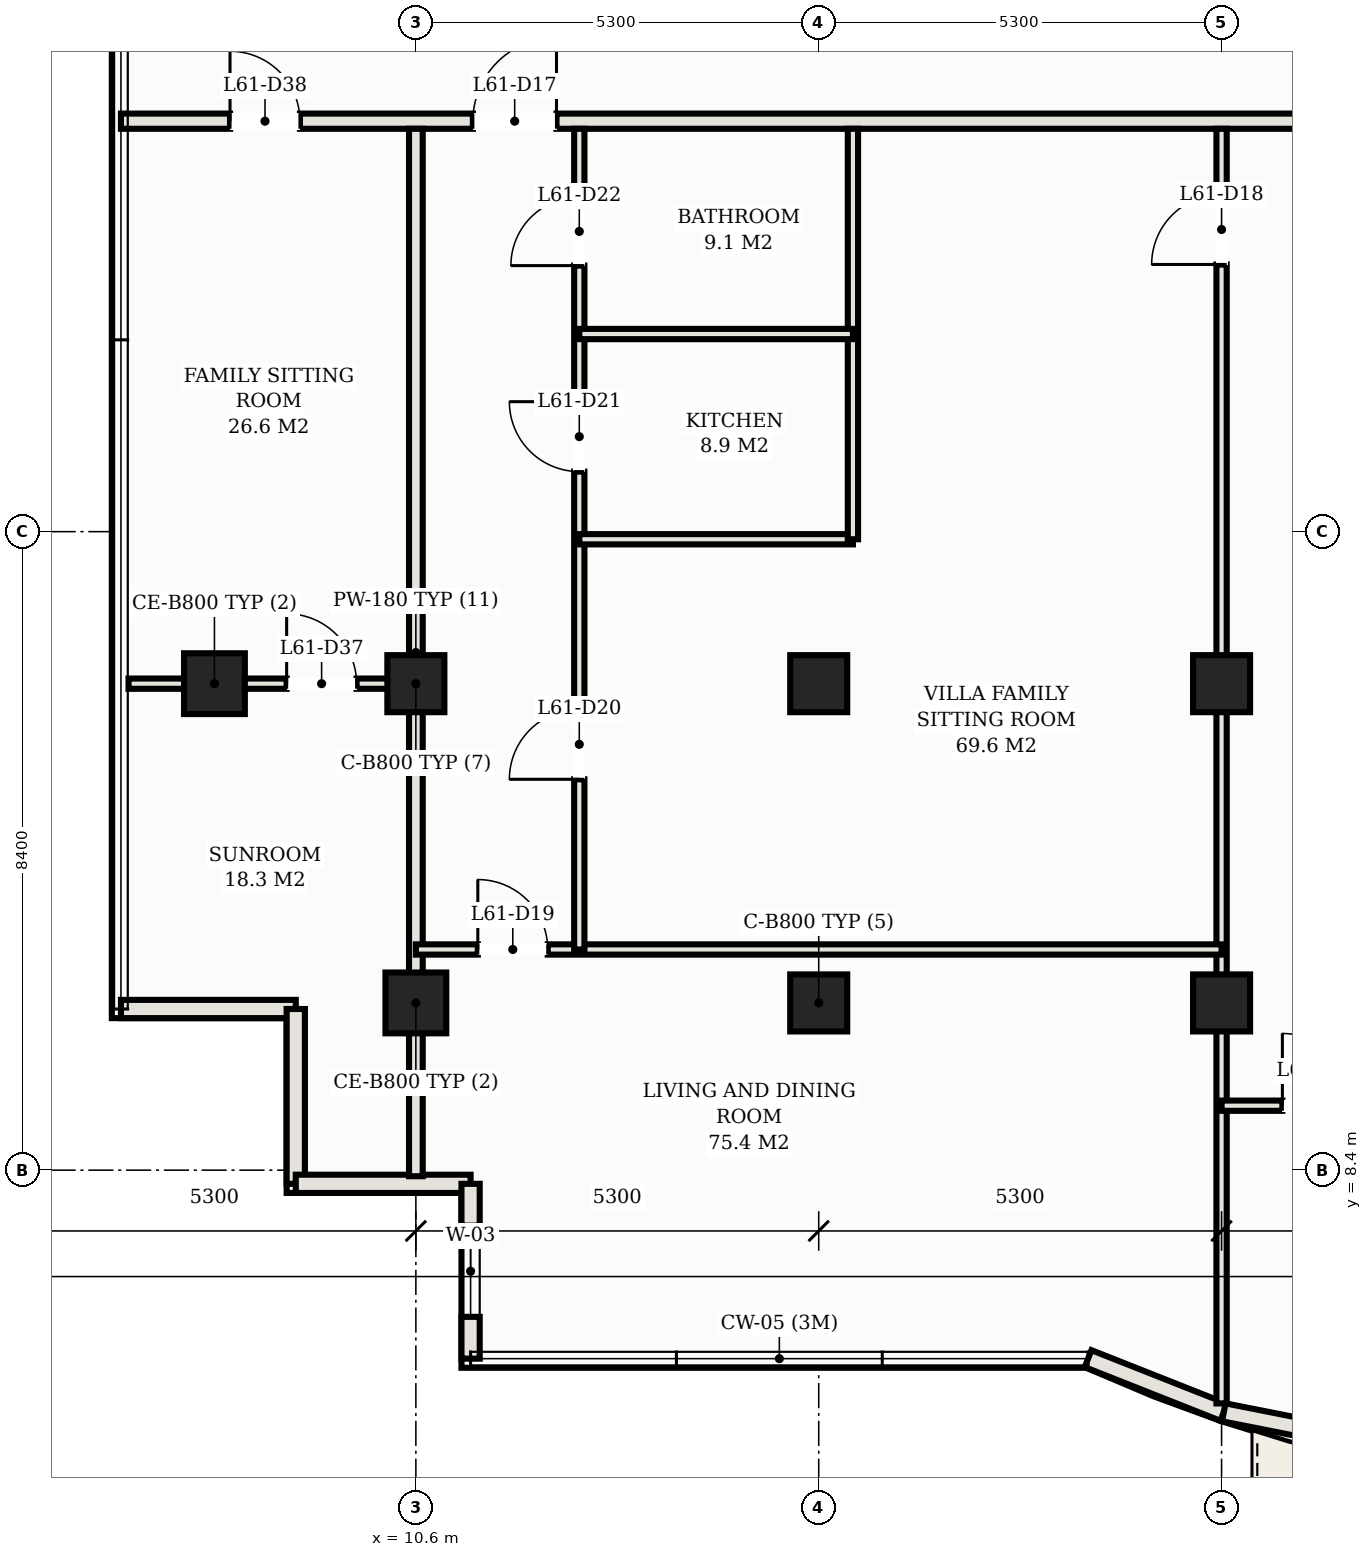
"""IFC4 building model, lengths in metres.
Left out: names, types, materials, properties, quantities, classifications, styles, units other than length and angle.
Written with IfcOpenShell. Run it as: python <this file> out.ifc"""

import sys

from ifc_helpers import new_model, si_unit, direction, frame, frame_2d, origin, origin_2d, place, context, subcontext, project, spatial, rectangle, hollow_rectangle, extrude, element, fill, save


model = new_model("IFC4")
c1 = context("Model", 3, precision=1e-05, world=origin(), true_north=direction((0.0, 1.0)))
c2 = subcontext(c1, "Body", "Model", "MODEL_VIEW")
j1 = project(units=[si_unit("LENGTHUNIT", "METRE"), si_unit("PLANEANGLEUNIT", "RADIAN")], contexts=[c1])
p1 = place(None, origin())
s1 = spatial("IfcSite", under=j1, at=p1, CompositionType="ELEMENT")
p2 = place(p1, origin())
s2 = spatial("IfcBuilding", under=s1, at=p2, CompositionType="ELEMENT")
p3 = place(p2, frame((0.0, 0.0, 223.1)))
s3 = spatial("IfcBuildingStorey", under=s2, at=p3, CompositionType="ELEMENT", Elevation=223.1)
p4 = place(p3, frame((10.6, 14.8, 0.0), z_axis=(0.0, 0.0, 1.0), x_axis=(1.0, 0.0, 0.0)))
e1 = element("IfcColumn", 1, at=p4, inside=s3, PredefinedType="COLUMN", context=c2, shape_type="SweptSolid", body=[
    extrude(hollow_rectangle(XDim=0.75, YDim=0.75, WallThickness=0.025, at=origin_2d()), origin(), (0.0, 0.0, 1.0), 3.3),
])
p5 = place(p3, frame((10.6, 10.6, 0.0), z_axis=(0.0, 0.0, 1.0), x_axis=(1.0, 0.0, 0.0)))
e2 = element("IfcColumn", 2, at=p5, inside=s3, PredefinedType="COLUMN", context=c2, shape_type="SweptSolid", body=[
    extrude(hollow_rectangle(XDim=0.8, YDim=0.8, WallThickness=0.028, at=origin_2d()), origin(), (0.0, 0.0, 1.0), 3.3),
])
for number, where, z_axis, x_axis in (
    (3, (15.9, 14.8, 0.0), (0.0, 0.0, 1.0), (1.0, 0.0, 0.0)),
    (4, (15.9, 10.6, 0.0), (0.0, 0.0, 1.0), (1.0, 0.0, 0.0)),
    (5, (21.2, 14.8, 0.0), (0.0, 0.0, 1.0), (1.0, 0.0, 0.0)),
    (6, (21.2, 10.6, 0.0), (0.0, 0.0, 1.0), (1.0, 0.0, 0.0)),
):
    element("IfcColumn", number, at=place(p3, frame(where, z_axis=z_axis, x_axis=x_axis)), inside=s3, PredefinedType="COLUMN", context=c2, shape_type="SweptSolid", body=[
        extrude(hollow_rectangle(XDim=0.75, YDim=0.75, WallThickness=0.025, at=origin_2d()), origin(), (0.0, 0.0, 1.0), 3.3),
    ])
p6 = place(p3, frame((7.95, 14.8, 0.0), z_axis=(0.0, 0.0, 1.0), x_axis=(1.0, 0.0, 0.0)))
e7 = element("IfcColumn", 7, at=p6, inside=s3, PredefinedType="COLUMN", context=c2, shape_type="SweptSolid", body=[
    extrude(hollow_rectangle(XDim=0.8, YDim=0.8, WallThickness=0.028, at=origin_2d()), origin(), (0.0, 0.0, 1.0), 3.3),
])
for number, where, z_axis, x_axis in (
    (8, (6.72, 10.52, 0.0), (0.0, 0.0, 1.0), (1.0, 0.0, 0.0)),
    (9, (9.02, 10.52, 0.0), (0.0, 0.0, 1.0), (0.0, -1.0, 0.0)),
    (10, (9.02, 8.22, 0.0), (0.0, 0.0, 1.0), (1.0, 0.0, 0.0)),
):
    element("IfcWall", number, at=place(p3, frame(where, z_axis=z_axis, x_axis=x_axis)), inside=s3, PredefinedType="SOLIDWALL", context=c2, shape_type="SweptSolid", body=[
        extrude(rectangle(XDim=2.3, YDim=0.24, at=frame_2d((1.15, 0.0))), origin(), (0.0, 0.0, 1.0), 3.11),
    ])
p7 = place(p3, frame((11.32, 8.22, 0.0), z_axis=(0.0, 0.0, 1.0), x_axis=(0.0, -1.0, 0.0)))
e11 = element("IfcWall", 11, at=p7, inside=s3, PredefinedType="SOLIDWALL", context=c2, shape_type="SweptSolid", body=[
    extrude(rectangle(XDim=2.3, YDim=0.24, at=frame_2d((1.15, 0.0))), origin(), (0.0, 0.0, 1.0), 3.11),
])
p8 = place(p7, frame((0.55, 0.0, 0.75)))
e12 = element("IfcOpeningElement", 12, at=p8, cuts=e11, PredefinedType="OPENING", context=c2, shape_type="SweptSolid", body=[
    extrude(rectangle(XDim=1.2, YDim=1.5, at=frame_2d((0.6, 0.75))), frame((0.0, 0.13, 0.0), z_axis=(0.0, -1.0, 0.0), x_axis=(1.0, 0.0, 0.0)), (0.0, 0.0, 1.0), 0.26),
])
p9 = place(p3, frame((19.444, 5.92, 0.0), z_axis=(0.0, 0.0, 1.0), x_axis=(0.92993442177, -0.367725401906, 0.0)))
e13 = element("IfcWall", 13, at=p9, inside=s3, PredefinedType="SOLIDWALL", context=c2, shape_type="SweptSolid", body=[
    extrude(rectangle(XDim=1.919, YDim=0.24, at=frame_2d((0.96, 0.0))), origin(), (0.0, 0.0, 1.0), 3.11),
])
p10 = place(p3, frame((21.229, 5.214, 0.0), z_axis=(0.0, 0.0, 1.0), x_axis=(0.980985349685, -0.194081796425, 0.0)))
e14 = element("IfcWall", 14, at=p10, inside=s3, PredefinedType="SOLIDWALL", context=c2, shape_type="SweptSolid", body=[
    extrude(rectangle(XDim=4.478, YDim=0.24, at=frame_2d((2.239, 0.0))), origin(), (0.0, 0.0, 1.0), 3.11),
])
p11 = place(p10, frame((1.473, 0.0, 0.0)))
e15 = element("IfcOpeningElement", 15, at=p11, cuts=e14, PredefinedType="OPENING", context=c2, shape_type="SweptSolid", body=[
    extrude(rectangle(XDim=1.8, YDim=2.2, at=frame_2d((0.9, 1.1))), frame((0.0, 0.13, 0.0), z_axis=(0.0, -1.0, 0.0), x_axis=(1.0, 0.0, 0.0)), (0.0, 0.0, 1.0), 0.26),
])
p12 = place(p3, frame((6.72, 22.2, 0.0), z_axis=(0.0, 0.0, 1.0), x_axis=(1.0, 0.0, 0.0)))
e16 = element("IfcWall", 16, at=p12, inside=s3, PredefinedType="PARTITIONING", context=c2, shape_type="SweptSolid", body=[
    extrude(rectangle(XDim=39.56, YDim=0.2, at=frame_2d((19.78, 0.0))), origin(), (0.0, 0.0, 1.0), 2.43),
])
p13 = place(p12, frame((4.63, 0.0, 0.0)))
e17 = element("IfcOpeningElement", 17, at=p13, cuts=e16, PredefinedType="OPENING", context=c2, shape_type="SweptSolid", body=[
    extrude(rectangle(XDim=1.1, YDim=2.25, at=frame_2d((0.55, 1.125))), frame((0.0, 0.11, 0.0), z_axis=(0.0, -1.0, 0.0), x_axis=(1.0, 0.0, 0.0)), (0.0, 0.0, 1.0), 0.22),
])
p14 = place(p12, frame((20.53, 0.0, 0.0)))
e18 = element("IfcOpeningElement", 18, at=p14, cuts=e16, PredefinedType="OPENING", context=c2, shape_type="SweptSolid", body=[
    extrude(rectangle(XDim=1.1, YDim=2.25, at=frame_2d((0.55, 1.125))), frame((0.0, 0.11, 0.0), z_axis=(0.0, -1.0, 0.0), x_axis=(1.0, 0.0, 0.0)), (0.0, 0.0, 1.0), 0.22),
])
p15 = place(p12, frame((1.435, 0.0, 0.0)))
e19 = element("IfcOpeningElement", 19, at=p15, cuts=e16, PredefinedType="OPENING", context=c2, shape_type="SweptSolid", body=[
    extrude(rectangle(XDim=0.92, YDim=2.15, at=frame_2d((0.46, 1.075))), frame((0.0, 0.11, 0.0), z_axis=(0.0, -1.0, 0.0), x_axis=(1.0, 0.0, 0.0)), (0.0, 0.0, 1.0), 0.22),
])
p16 = place(p12, frame((37.205, 0.0, 0.0)))
e20 = element("IfcOpeningElement", 20, at=p16, cuts=e16, PredefinedType="OPENING", context=c2, shape_type="SweptSolid", body=[
    extrude(rectangle(XDim=0.92, YDim=2.15, at=frame_2d((0.46, 1.075))), frame((0.0, 0.11, 0.0), z_axis=(0.0, -1.0, 0.0), x_axis=(1.0, 0.0, 0.0)), (0.0, 0.0, 1.0), 0.22),
])
p17 = place(p3, frame((10.6, 8.32, 0.0), z_axis=(0.0, 0.0, 1.0), x_axis=(0.0, 1.0, 0.0)))
e21 = element("IfcWall", 21, at=p17, inside=s3, PredefinedType="PARTITIONING", context=c2, shape_type="SweptSolid", body=[
    extrude(rectangle(XDim=13.78, YDim=0.18, at=frame_2d((6.89, 0.0))), origin(), (0.0, 0.0, 1.0), 2.43),
])
p18 = place(p3, frame((21.2, 5.331, 0.0), z_axis=(0.0, 0.0, 1.0), x_axis=(0.0, 1.0, 0.0)))
e22 = element("IfcWall", 22, at=p18, inside=s3, PredefinedType="PARTITIONING", context=c2, shape_type="SweptSolid", body=[
    extrude(rectangle(XDim=16.769, YDim=0.135, at=frame_2d((8.385, 0.0))), origin(), (0.0, 0.0, 1.0), 2.43),
])
p19 = place(p18, frame((14.984, 0.0, 0.0)))
e23 = element("IfcOpeningElement", 23, at=p19, cuts=e22, PredefinedType="OPENING", context=c2, shape_type="SweptSolid", body=[
    extrude(rectangle(XDim=0.92, YDim=2.15, at=frame_2d((0.46, 1.075))), frame((0.0, 0.078, 0.0), z_axis=(0.0, -1.0, 0.0), x_axis=(1.0, 0.0, 0.0)), (0.0, 0.0, 1.0), 0.155),
])
p20 = place(p3, frame((10.6, 11.303, 0.0), z_axis=(0.0, 0.0, 1.0), x_axis=(1.0, 0.0, 0.0)))
e24 = element("IfcWall", 24, at=p20, inside=s3, PredefinedType="PARTITIONING", context=c2, shape_type="SweptSolid", body=[
    extrude(rectangle(XDim=10.6, YDim=0.135, at=frame_2d((5.3, 0.0))), origin(), (0.0, 0.0, 1.0), 2.43),
])
p21 = place(p20, frame((0.815, 0.0, 0.0)))
e25 = element("IfcOpeningElement", 25, at=p21, cuts=e24, PredefinedType="OPENING", context=c2, shape_type="SweptSolid", body=[
    extrude(rectangle(XDim=0.92, YDim=2.15, at=frame_2d((0.46, 1.075))), frame((0.0, 0.078, 0.0), z_axis=(0.0, -1.0, 0.0), x_axis=(1.0, 0.0, 0.0)), (0.0, 0.0, 1.0), 0.155),
])
p22 = place(p3, frame((12.75, 11.303, 0.0), z_axis=(0.0, 0.0, 1.0), x_axis=(0.0, 1.0, 0.0)))
e26 = element("IfcWall", 26, at=p22, inside=s3, PredefinedType="PARTITIONING", context=c2, shape_type="SweptSolid", body=[
    extrude(rectangle(XDim=10.797, YDim=0.135, at=frame_2d((5.398, 0.0))), origin(), (0.0, 0.0, 1.0), 2.43),
])
p23 = place(p22, frame((2.239, 0.0, 0.0)))
e27 = element("IfcOpeningElement", 27, at=p23, cuts=e26, PredefinedType="OPENING", context=c2, shape_type="SweptSolid", body=[
    extrude(rectangle(XDim=0.92, YDim=2.15, at=frame_2d((0.46, 1.075))), frame((0.0, 0.078, 0.0), z_axis=(0.0, -1.0, 0.0), x_axis=(1.0, 0.0, 0.0)), (0.0, 0.0, 1.0), 0.155),
])
p24 = place(p22, frame((6.287, 0.0, 0.0)))
e28 = element("IfcOpeningElement", 28, at=p24, cuts=e26, PredefinedType="OPENING", context=c2, shape_type="SweptSolid", body=[
    extrude(rectangle(XDim=0.92, YDim=2.15, at=frame_2d((0.46, 1.075))), frame((0.0, 0.078, 0.0), z_axis=(0.0, -1.0, 0.0), x_axis=(1.0, 0.0, 0.0)), (0.0, 0.0, 1.0), 0.155),
])
p25 = place(p22, frame((8.997, 0.0, 0.0)))
e29 = element("IfcOpeningElement", 29, at=p25, cuts=e26, PredefinedType="OPENING", context=c2, shape_type="SweptSolid", body=[
    extrude(rectangle(XDim=0.9, YDim=2.15, at=frame_2d((0.45, 1.075))), frame((0.0, 0.078, 0.0), z_axis=(0.0, -1.0, 0.0), x_axis=(1.0, 0.0, 0.0)), (0.0, 0.0, 1.0), 0.155),
])
p26 = place(p3, frame((12.75, 16.7, 0.0), z_axis=(0.0, 0.0, 1.0), x_axis=(1.0, 0.0, 0.0)))
e30 = element("IfcWall", 30, at=p26, inside=s3, PredefinedType="PARTITIONING", context=c2, shape_type="SweptSolid", body=[
    extrude(rectangle(XDim=3.6, YDim=0.135, at=frame_2d((1.8, 0.0))), origin(), (0.0, 0.0, 1.0), 2.43),
])
p27 = place(p3, frame((16.35, 16.7, 0.0), z_axis=(0.0, 0.0, 1.0), x_axis=(0.0, 1.0, 0.0)))
e31 = element("IfcWall", 31, at=p27, inside=s3, PredefinedType="PARTITIONING", context=c2, shape_type="SweptSolid", body=[
    extrude(rectangle(XDim=5.4, YDim=0.135, at=frame_2d((2.7, 0.0))), origin(), (0.0, 0.0, 1.0), 2.43),
])
p28 = place(p3, frame((12.75, 19.4, 0.0), z_axis=(0.0, 0.0, 1.0), x_axis=(1.0, 0.0, 0.0)))
e32 = element("IfcWall", 32, at=p28, inside=s3, PredefinedType="PARTITIONING", context=c2, shape_type="SweptSolid", body=[
    extrude(rectangle(XDim=3.6, YDim=0.135, at=frame_2d((1.8, 0.0))), origin(), (0.0, 0.0, 1.0), 2.43),
])
p29 = place(p3, frame((21.2, 9.248, 0.0), z_axis=(0.0, 0.0, 1.0), x_axis=(1.0, 0.0, 0.0)))
e33 = element("IfcWall", 33, at=p29, inside=s3, PredefinedType="PARTITIONING", context=c2, shape_type="SweptSolid", body=[
    extrude(rectangle(XDim=5.3, YDim=0.135, at=frame_2d((2.65, 0.0))), origin(), (0.0, 0.0, 1.0), 2.43),
])
p30 = place(p29, frame((0.8, 0.0, 0.0)))
e34 = element("IfcOpeningElement", 34, at=p30, cuts=e33, PredefinedType="OPENING", context=c2, shape_type="SweptSolid", body=[
    extrude(rectangle(XDim=0.95, YDim=2.15, at=frame_2d((0.475, 1.075))), frame((0.0, 0.078, 0.0), z_axis=(0.0, -1.0, 0.0), x_axis=(1.0, 0.0, 0.0)), (0.0, 0.0, 1.0), 0.155),
])
p31 = place(p29, frame((3.275, 0.0, 0.0)))
e35 = element("IfcOpeningElement", 35, at=p31, cuts=e33, PredefinedType="OPENING", context=c2, shape_type="SweptSolid", body=[
    extrude(rectangle(XDim=0.9, YDim=2.15, at=frame_2d((0.45, 1.075))), frame((0.0, 0.078, 0.0), z_axis=(0.0, -1.0, 0.0), x_axis=(1.0, 0.0, 0.0)), (0.0, 0.0, 1.0), 0.155),
])
p32 = place(p3, frame((6.82, 14.8, 0.0), z_axis=(0.0, 0.0, 1.0), x_axis=(1.0, 0.0, 0.0)))
e36 = element("IfcWall", 36, at=p32, inside=s3, PredefinedType="PARTITIONING", context=c2, shape_type="SweptSolid", body=[
    extrude(rectangle(XDim=3.78, YDim=0.135, at=frame_2d((1.89, 0.0))), origin(), (0.0, 0.0, 1.0), 2.43),
])
p33 = place(p32, frame((2.08, 0.0, 0.0)))
e37 = element("IfcOpeningElement", 37, at=p33, cuts=e36, PredefinedType="OPENING", context=c2, shape_type="SweptSolid", body=[
    extrude(rectangle(XDim=0.92, YDim=2.15, at=frame_2d((0.46, 1.075))), frame((0.0, 0.078, 0.0), z_axis=(0.0, -1.0, 0.0), x_axis=(1.0, 0.0, 0.0)), (0.0, 0.0, 1.0), 0.155),
])
p34 = place(p8, origin())
e38 = element("IfcWindow", 38, at=p34, inside=s3, PartitioningType="SINGLE_PANEL", PredefinedType="WINDOW", context=c2, shape_type="SweptSolid", body=[
    extrude(rectangle(XDim=1.2, YDim=1.5, at=frame_2d((0.6, 0.75))), frame((0.0, 0.03, 0.0), z_axis=(0.0, -1.0, 0.0), x_axis=(1.0, 0.0, 0.0)), (0.0, 0.0, 1.0), 0.06),
])
fill(e12, e38)
p35 = place(p13, origin())
e39 = element("IfcDoor", 39, at=p35, inside=s3, OperationType="SINGLE_SWING_RIGHT", PredefinedType="DOOR", context=c2, shape_type="SweptSolid", body=[
    extrude(rectangle(XDim=1.1, YDim=2.25, at=frame_2d((0.55, 1.125))), frame((0.0, 0.025, 0.0), z_axis=(0.0, -1.0, 0.0), x_axis=(1.0, 0.0, 0.0)), (0.0, 0.0, 1.0), 0.05),
])
fill(e17, e39)
p36 = place(p19, origin())
e40 = element("IfcDoor", 40, at=p36, inside=s3, OperationType="SINGLE_SWING_LEFT", PredefinedType="DOOR", context=c2, shape_type="SweptSolid", body=[
    extrude(rectangle(XDim=0.92, YDim=2.15, at=frame_2d((0.46, 1.075))), frame((0.0, 0.025, 0.0), z_axis=(0.0, -1.0, 0.0), x_axis=(1.0, 0.0, 0.0)), (0.0, 0.0, 1.0), 0.05),
])
fill(e23, e40)
p37 = place(p21, origin())
e41 = element("IfcDoor", 41, at=p37, inside=s3, OperationType="SINGLE_SWING_LEFT", PredefinedType="DOOR", context=c2, shape_type="SweptSolid", body=[
    extrude(rectangle(XDim=0.92, YDim=2.15, at=frame_2d((0.46, 1.075))), frame((0.0, 0.025, 0.0), z_axis=(0.0, -1.0, 0.0), x_axis=(1.0, 0.0, 0.0)), (0.0, 0.0, 1.0), 0.05),
])
fill(e25, e41)
p38 = place(p23, origin())
e42 = element("IfcDoor", 42, at=p38, inside=s3, OperationType="SINGLE_SWING_LEFT", PredefinedType="DOOR", context=c2, shape_type="SweptSolid", body=[
    extrude(rectangle(XDim=0.92, YDim=2.15, at=frame_2d((0.46, 1.075))), frame((0.0, 0.025, 0.0), z_axis=(0.0, -1.0, 0.0), x_axis=(1.0, 0.0, 0.0)), (0.0, 0.0, 1.0), 0.05),
])
fill(e27, e42)
p39 = place(p24, origin())
e43 = element("IfcDoor", 43, at=p39, inside=s3, OperationType="SINGLE_SWING_RIGHT", PredefinedType="DOOR", context=c2, shape_type="SweptSolid", body=[
    extrude(rectangle(XDim=0.92, YDim=2.15, at=frame_2d((0.46, 1.075))), frame((0.0, 0.025, 0.0), z_axis=(0.0, -1.0, 0.0), x_axis=(1.0, 0.0, 0.0)), (0.0, 0.0, 1.0), 0.05),
])
fill(e28, e43)
p40 = place(p25, origin())
e44 = element("IfcDoor", 44, at=p40, inside=s3, OperationType="SINGLE_SWING_LEFT", PredefinedType="DOOR", context=c2, shape_type="SweptSolid", body=[
    extrude(rectangle(XDim=0.9, YDim=2.15, at=frame_2d((0.45, 1.075))), frame((0.0, 0.025, 0.0), z_axis=(0.0, -1.0, 0.0), x_axis=(1.0, 0.0, 0.0)), (0.0, 0.0, 1.0), 0.05),
])
fill(e29, e44)
p41 = place(p30, origin())
e45 = element("IfcDoor", 45, at=p41, inside=s3, OperationType="SINGLE_SWING_LEFT", PredefinedType="DOOR", context=c2, shape_type="SweptSolid", body=[
    extrude(rectangle(XDim=0.95, YDim=2.15, at=frame_2d((0.475, 1.075))), frame((0.0, 0.025, 0.0), z_axis=(0.0, -1.0, 0.0), x_axis=(1.0, 0.0, 0.0)), (0.0, 0.0, 1.0), 0.05),
])
fill(e34, e45)
p42 = place(p33, origin())
e46 = element("IfcDoor", 46, at=p42, inside=s3, OperationType="SINGLE_SWING_LEFT", PredefinedType="DOOR", context=c2, shape_type="SweptSolid", body=[
    extrude(rectangle(XDim=0.92, YDim=2.15, at=frame_2d((0.46, 1.075))), frame((0.0, 0.025, 0.0), z_axis=(0.0, -1.0, 0.0), x_axis=(1.0, 0.0, 0.0)), (0.0, 0.0, 1.0), 0.05),
])
fill(e37, e46)
p43 = place(p15, origin())
e47 = element("IfcDoor", 47, at=p43, inside=s3, OperationType="SINGLE_SWING_LEFT", PredefinedType="DOOR", context=c2, shape_type="SweptSolid", body=[
    extrude(rectangle(XDim=0.92, YDim=2.15, at=frame_2d((0.46, 1.075))), frame((0.0, 0.025, 0.0), z_axis=(0.0, -1.0, 0.0), x_axis=(1.0, 0.0, 0.0)), (0.0, 0.0, 1.0), 0.05),
])
fill(e19, e47)
save(model, sys.argv[1])
